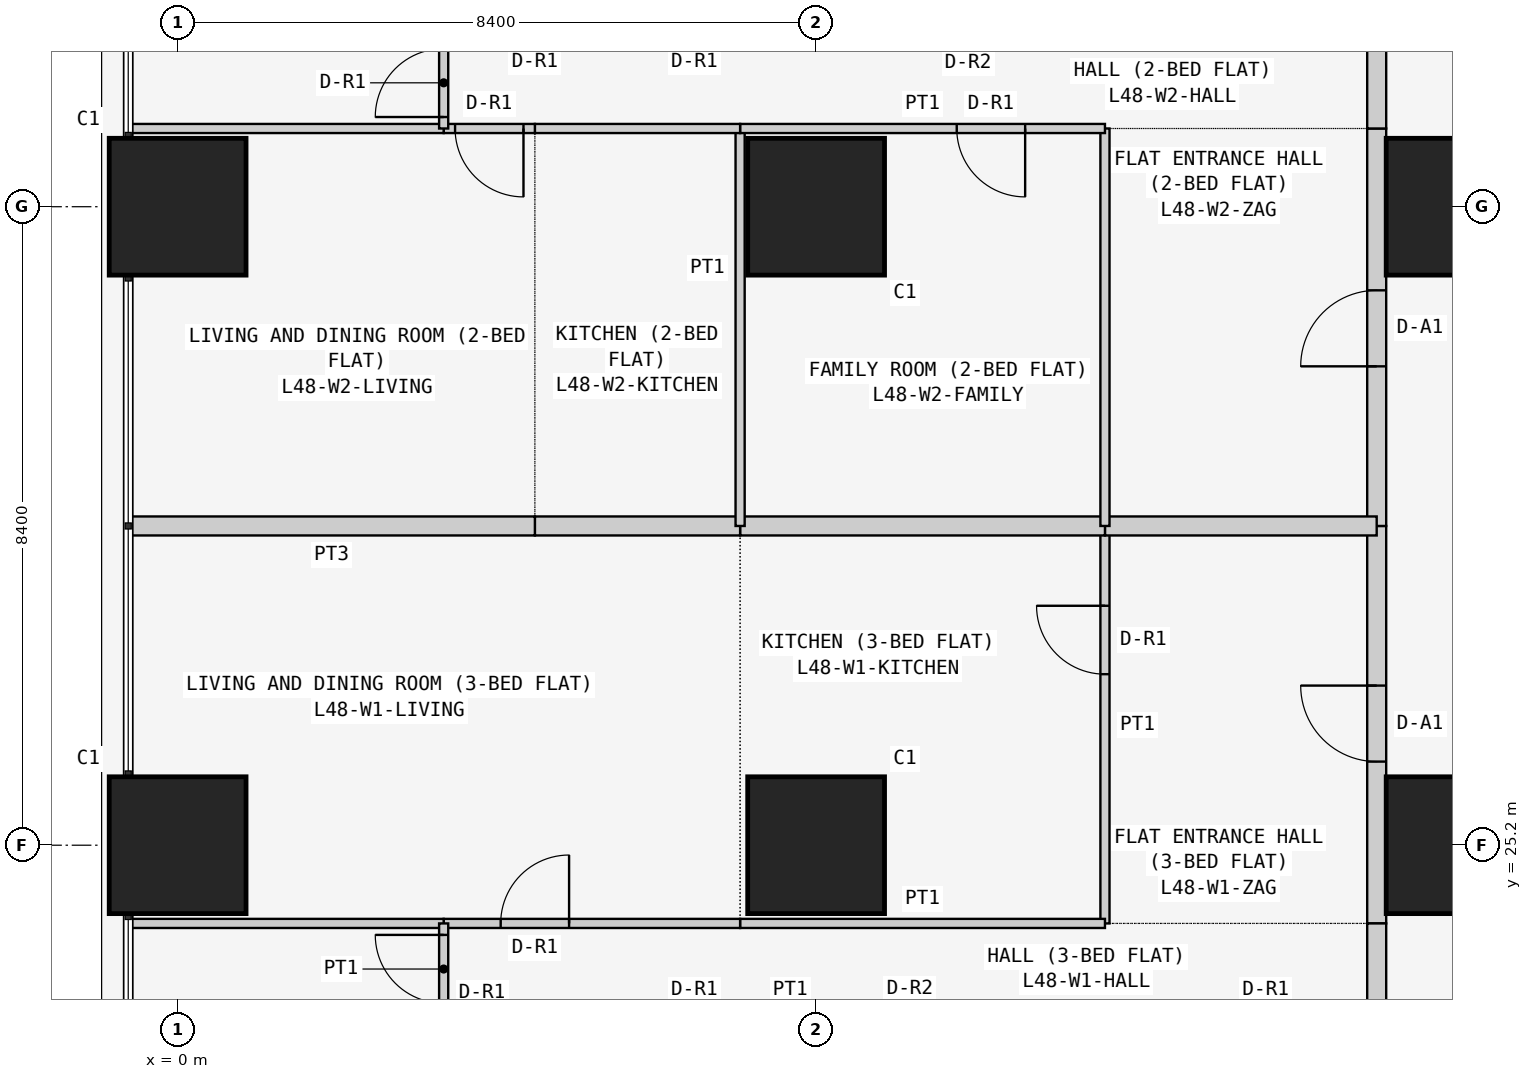
"""IFC4 building model, lengths in metres.
Left out: names, types, materials, properties, quantities, classifications, styles, units other than length and angle.
Written with IfcOpenShell. Run it as: python <this file> out.ifc"""

import sys

from ifc_helpers import new_model, si_unit, direction, frame, frame_2d, origin, origin_2d, place, context, subcontext, project, spatial, rectangle, extrude, element, fill, save


model = new_model("IFC4")
c1 = context("Model", 3, precision=1e-05, world=origin(), true_north=direction((0.0, 1.0)))
c2 = subcontext(c1, "Body", "Model", "MODEL_VIEW")
j1 = project(units=[si_unit("LENGTHUNIT", "METRE"), si_unit("PLANEANGLEUNIT", "RADIAN")], contexts=[c1])
p1 = place(None, origin())
s1 = spatial("IfcSite", under=j1, at=p1, CompositionType="ELEMENT")
p2 = place(p1, origin())
s2 = spatial("IfcBuilding", under=s1, at=p2, CompositionType="ELEMENT")
p3 = place(p2, frame((0.0, 0.0, 186.9)))
s3 = spatial("IfcBuildingStorey", under=s2, at=p3, CompositionType="ELEMENT", Elevation=186.9)
for number, where, z_axis, x_axis in (
    (1, (0.0, 25.2, 0.0), (0.0, 0.0, 1.0), (1.0, 0.0, 0.0)),
    (2, (0.0, 33.6, 0.0), (0.0, 0.0, 1.0), (1.0, 0.0, 0.0)),
    (3, (8.4, 25.2, 0.0), (0.0, 0.0, 1.0), (1.0, 0.0, 0.0)),
    (4, (8.4, 33.6, 0.0), (0.0, 0.0, 1.0), (1.0, 0.0, 0.0)),
    (5, (16.8, 25.2, 0.0), (0.0, 0.0, 1.0), (1.0, 0.0, 0.0)),
    (6, (16.8, 33.6, 0.0), (0.0, 0.0, 1.0), (1.0, 0.0, 0.0)),
):
    element("IfcColumn", number, at=place(p3, frame(where, z_axis=z_axis, x_axis=x_axis)), inside=s3, PredefinedType="COLUMN", context=c2, shape_type="SweptSolid", body=[
        extrude(rectangle(XDim=1.8, YDim=1.8, at=origin_2d()), origin(), (0.0, 0.0, 1.0), 3.6),
    ])
p4 = place(p3, frame((15.775, 24.171, 0.0), z_axis=(0.0, 0.0, 1.0), x_axis=(0.0, 1.0, 0.0)))
e7 = element("IfcWall", 7, at=p4, inside=s3, PredefinedType="PARTITIONING", context=c2, shape_type="SweptSolid", body=[
    extrude(rectangle(XDim=5.229, YDim=0.25, at=frame_2d((2.615, 0.0))), origin(), (0.0, 0.0, 1.0), 3.45),
])
p5 = place(p4, frame((2.129, 0.0, 0.0)))
e8 = element("IfcOpeningElement", 8, at=p5, cuts=e7, PredefinedType="OPENING", context=c2, shape_type="SweptSolid", body=[
    extrude(rectangle(XDim=1.0, YDim=2.1, at=frame_2d((0.5, 1.05))), frame((0.0, 0.135, 0.0), z_axis=(0.0, -1.0, 0.0), x_axis=(1.0, 0.0, 0.0)), (0.0, 0.0, 1.0), 0.27),
])
p6 = place(p3, frame((15.775, 22.971, 0.0), z_axis=(0.0, 0.0, 1.0), x_axis=(0.0, 1.0, 0.0)))
e9 = element("IfcWall", 9, at=p6, inside=s3, PredefinedType="PARTITIONING", context=c2, shape_type="SweptSolid", body=[
    extrude(rectangle(XDim=1.2, YDim=0.25, at=frame_2d((0.6, 0.0))), origin(), (0.0, 0.0, 1.0), 3.45),
])
p7 = place(p3, frame((15.775, 29.4, 0.0), z_axis=(0.0, 0.0, 1.0), x_axis=(0.0, 1.0, 0.0)))
e10 = element("IfcWall", 10, at=p7, inside=s3, PredefinedType="PARTITIONING", context=c2, shape_type="SweptSolid", body=[
    extrude(rectangle(XDim=5.229, YDim=0.25, at=frame_2d((2.615, 0.0))), origin(), (0.0, 0.0, 1.0), 3.45),
])
p8 = place(p7, frame((2.1, 0.0, 0.0)))
e11 = element("IfcOpeningElement", 11, at=p8, cuts=e10, PredefinedType="OPENING", context=c2, shape_type="SweptSolid", body=[
    extrude(rectangle(XDim=1.0, YDim=2.1, at=frame_2d((0.5, 1.05))), frame((0.0, 0.135, 0.0), z_axis=(0.0, -1.0, 0.0), x_axis=(1.0, 0.0, 0.0)), (0.0, 0.0, 1.0), 0.27),
])
p9 = place(p3, frame((15.775, 34.629, 0.0), z_axis=(0.0, 0.0, 1.0), x_axis=(0.0, 1.0, 0.0)))
e12 = element("IfcWall", 12, at=p9, inside=s3, PredefinedType="PARTITIONING", context=c2, shape_type="SweptSolid", body=[
    extrude(rectangle(XDim=1.2, YDim=0.25, at=frame_2d((0.6, 0.0))), origin(), (0.0, 0.0, 1.0), 3.45),
])
p10 = place(p3, frame((12.2, 29.4, 0.0), z_axis=(0.0, 0.0, 1.0), x_axis=(0.0, -1.0, 0.0)))
e13 = element("IfcWall", 13, at=p10, inside=s3, PredefinedType="PARTITIONING", context=c2, shape_type="SweptSolid", body=[
    extrude(rectangle(XDim=5.229, YDim=0.12, at=frame_2d((2.615, 0.0))), origin(), (0.0, 0.0, 1.0), 3.45),
])
p11 = place(p10, frame((1.05, 0.0, 0.0)))
e14 = element("IfcOpeningElement", 14, at=p11, cuts=e13, PredefinedType="OPENING", context=c2, shape_type="SweptSolid", body=[
    extrude(rectangle(XDim=0.9, YDim=2.1, at=frame_2d((0.45, 1.05))), frame((0.0, 0.07, 0.0), z_axis=(0.0, -1.0, 0.0), x_axis=(1.0, 0.0, 0.0)), (0.0, 0.0, 1.0), 0.14),
])
p12 = place(p3, frame((15.775, 29.4, 0.0), z_axis=(0.0, 0.0, 1.0), x_axis=(-1.0, 0.0, 0.0)))
e15 = element("IfcWall", 15, at=p12, inside=s3, PredefinedType="PARTITIONING", context=c2, shape_type="SweptSolid", body=[
    extrude(rectangle(XDim=3.575, YDim=0.25, at=frame_2d((1.788, 0.0))), origin(), (0.0, 0.0, 1.0), 3.45),
])
p13 = place(p3, frame((7.4, 24.171, 0.0), z_axis=(0.0, 0.0, 1.0), x_axis=(1.0, 0.0, 0.0)))
e16 = element("IfcWall", 16, at=p13, inside=s3, PredefinedType="PARTITIONING", context=c2, shape_type="SweptSolid", body=[
    extrude(rectangle(XDim=4.8, YDim=0.12, at=frame_2d((2.4, 0.0))), origin(), (0.0, 0.0, 1.0), 3.45),
])
p14 = place(p3, frame((12.2, 29.4, 0.0), z_axis=(0.0, 0.0, 1.0), x_axis=(-1.0, 0.0, 0.0)))
e17 = element("IfcWall", 17, at=p14, inside=s3, PredefinedType="PARTITIONING", context=c2, shape_type="SweptSolid", body=[
    extrude(rectangle(XDim=4.8, YDim=0.25, at=frame_2d((2.4, 0.0))), origin(), (0.0, 0.0, 1.0), 3.45),
])
p15 = place(p3, frame((3.5, 24.171, 0.0), z_axis=(0.0, 0.0, 1.0), x_axis=(1.0, 0.0, 0.0)))
e18 = element("IfcWall", 18, at=p15, inside=s3, PredefinedType="PARTITIONING", context=c2, shape_type="SweptSolid", body=[
    extrude(rectangle(XDim=3.9, YDim=0.12, at=frame_2d((1.95, 0.0))), origin(), (0.0, 0.0, 1.0), 3.45),
])
p16 = place(p15, frame((0.75, 0.0, 0.0)))
e19 = element("IfcOpeningElement", 19, at=p16, cuts=e18, PredefinedType="OPENING", context=c2, shape_type="SweptSolid", body=[
    extrude(rectangle(XDim=0.9, YDim=2.1, at=frame_2d((0.45, 1.05))), frame((0.0, 0.07, 0.0), z_axis=(0.0, -1.0, 0.0), x_axis=(1.0, 0.0, 0.0)), (0.0, 0.0, 1.0), 0.14),
])
p17 = place(p3, frame((-0.65, 24.171, 0.0), z_axis=(0.0, 0.0, 1.0), x_axis=(1.0, 0.0, 0.0)))
e20 = element("IfcWall", 20, at=p17, inside=s3, PredefinedType="PARTITIONING", context=c2, shape_type="SweptSolid", body=[
    extrude(rectangle(XDim=4.15, YDim=0.12, at=frame_2d((2.075, 0.0))), origin(), (0.0, 0.0, 1.0), 3.45),
])
p18 = place(p3, frame((7.4, 29.4, 0.0), z_axis=(0.0, 0.0, 1.0), x_axis=(-1.0, 0.0, 0.0)))
e21 = element("IfcWall", 21, at=p18, inside=s3, PredefinedType="PARTITIONING", context=c2, shape_type="SweptSolid", body=[
    extrude(rectangle(XDim=2.7, YDim=0.25, at=frame_2d((1.35, 0.0))), origin(), (0.0, 0.0, 1.0), 3.45),
])
p19 = place(p3, frame((4.7, 29.4, 0.0), z_axis=(0.0, 0.0, 1.0), x_axis=(-1.0, 0.0, 0.0)))
e22 = element("IfcWall", 22, at=p19, inside=s3, PredefinedType="PARTITIONING", context=c2, shape_type="SweptSolid", body=[
    extrude(rectangle(XDim=5.35, YDim=0.25, at=frame_2d((2.675, 0.0))), origin(), (0.0, 0.0, 1.0), 3.45),
])
p20 = place(p3, frame((3.5, 24.171, 0.0), z_axis=(0.0, 0.0, 1.0), x_axis=(0.0, -1.0, 0.0)))
e23 = element("IfcWall", 23, at=p20, inside=s3, PredefinedType="PARTITIONING", context=c2, shape_type="SweptSolid", body=[
    extrude(rectangle(XDim=1.2, YDim=0.12, at=frame_2d((0.6, 0.0))), origin(), (0.0, 0.0, 1.0), 3.45),
])
p21 = place(p20, frame((0.151, 0.0, 0.0)))
e24 = element("IfcOpeningElement", 24, at=p21, cuts=e23, PredefinedType="OPENING", context=c2, shape_type="SweptSolid", body=[
    extrude(rectangle(XDim=0.9, YDim=2.1, at=frame_2d((0.45, 1.05))), frame((0.0, 0.07, 0.0), z_axis=(0.0, -1.0, 0.0), x_axis=(1.0, 0.0, 0.0)), (0.0, 0.0, 1.0), 0.14),
])
for number, where, z_axis, x_axis in (
    (25, (12.2, 29.4, 0.0), (0.0, 0.0, 1.0), (0.0, 1.0, 0.0)),
    (26, (7.4, 29.4, 0.0), (0.0, 0.0, 1.0), (0.0, 1.0, 0.0)),
):
    element("IfcWall", number, at=place(p3, frame(where, z_axis=z_axis, x_axis=x_axis)), inside=s3, PredefinedType="PARTITIONING", context=c2, shape_type="SweptSolid", body=[
        extrude(rectangle(XDim=5.229, YDim=0.12, at=frame_2d((2.615, 0.0))), origin(), (0.0, 0.0, 1.0), 3.45),
    ])
p22 = place(p3, frame((7.4, 34.629, 0.0), z_axis=(0.0, 0.0, 1.0), x_axis=(1.0, 0.0, 0.0)))
e27 = element("IfcWall", 27, at=p22, inside=s3, PredefinedType="PARTITIONING", context=c2, shape_type="SweptSolid", body=[
    extrude(rectangle(XDim=4.8, YDim=0.12, at=frame_2d((2.4, 0.0))), origin(), (0.0, 0.0, 1.0), 3.45),
])
p23 = place(p22, frame((2.85, 0.0, 0.0)))
e28 = element("IfcOpeningElement", 28, at=p23, cuts=e27, PredefinedType="OPENING", context=c2, shape_type="SweptSolid", body=[
    extrude(rectangle(XDim=0.9, YDim=2.1, at=frame_2d((0.45, 1.05))), frame((0.0, 0.07, 0.0), z_axis=(0.0, -1.0, 0.0), x_axis=(1.0, 0.0, 0.0)), (0.0, 0.0, 1.0), 0.14),
])
p24 = place(p3, frame((4.7, 34.629, 0.0), z_axis=(0.0, 0.0, 1.0), x_axis=(1.0, 0.0, 0.0)))
e29 = element("IfcWall", 29, at=p24, inside=s3, PredefinedType="PARTITIONING", context=c2, shape_type="SweptSolid", body=[
    extrude(rectangle(XDim=2.7, YDim=0.12, at=frame_2d((1.35, 0.0))), origin(), (0.0, 0.0, 1.0), 3.45),
])
p25 = place(p3, frame((3.5, 34.629, 0.0), z_axis=(0.0, 0.0, 1.0), x_axis=(1.0, 0.0, 0.0)))
e30 = element("IfcWall", 30, at=p25, inside=s3, PredefinedType="PARTITIONING", context=c2, shape_type="SweptSolid", body=[
    extrude(rectangle(XDim=1.2, YDim=0.12, at=frame_2d((0.6, 0.0))), origin(), (0.0, 0.0, 1.0), 3.45),
])
p26 = place(p25, frame((0.15, 0.0, 0.0)))
e31 = element("IfcOpeningElement", 31, at=p26, cuts=e30, PredefinedType="OPENING", context=c2, shape_type="SweptSolid", body=[
    extrude(rectangle(XDim=0.9, YDim=2.1, at=frame_2d((0.45, 1.05))), frame((0.0, 0.07, 0.0), z_axis=(0.0, -1.0, 0.0), x_axis=(1.0, 0.0, 0.0)), (0.0, 0.0, 1.0), 0.14),
])
p27 = place(p3, frame((-0.65, 34.629, 0.0), z_axis=(0.0, 0.0, 1.0), x_axis=(1.0, 0.0, 0.0)))
e32 = element("IfcWall", 32, at=p27, inside=s3, PredefinedType="PARTITIONING", context=c2, shape_type="SweptSolid", body=[
    extrude(rectangle(XDim=4.15, YDim=0.12, at=frame_2d((2.075, 0.0))), origin(), (0.0, 0.0, 1.0), 3.45),
])
p28 = place(p3, frame((3.5, 34.629, 0.0), z_axis=(0.0, 0.0, 1.0), x_axis=(0.0, 1.0, 0.0)))
e33 = element("IfcWall", 33, at=p28, inside=s3, PredefinedType="PARTITIONING", context=c2, shape_type="SweptSolid", body=[
    extrude(rectangle(XDim=1.2, YDim=0.12, at=frame_2d((0.6, 0.0))), origin(), (0.0, 0.0, 1.0), 3.45),
])
p29 = place(p28, frame((0.151, 0.0, 0.0)))
e34 = element("IfcOpeningElement", 34, at=p29, cuts=e33, PredefinedType="OPENING", context=c2, shape_type="SweptSolid", body=[
    extrude(rectangle(XDim=0.9, YDim=2.1, at=frame_2d((0.45, 1.05))), frame((0.0, 0.07, 0.0), z_axis=(0.0, -1.0, 0.0), x_axis=(1.0, 0.0, 0.0)), (0.0, 0.0, 1.0), 0.14),
])
p30 = place(p5, origin())
e35 = element("IfcDoor", 35, at=p30, inside=s3, OperationType="SINGLE_SWING_RIGHT", PredefinedType="DOOR", context=c2, shape_type="SweptSolid", body=[
    extrude(rectangle(XDim=1.0, YDim=2.1, at=frame_2d((0.5, 1.05))), frame((0.0, 0.025, 0.0), z_axis=(0.0, -1.0, 0.0), x_axis=(1.0, 0.0, 0.0)), (0.0, 0.0, 1.0), 0.05),
])
fill(e8, e35)
p31 = place(p11, frame((0.9, 0.0, 0.0), z_axis=(0.0, 0.0, 1.0), x_axis=(-1.0, 0.0, 0.0)))
e36 = element("IfcDoor", 36, at=p31, inside=s3, OperationType="SINGLE_SWING_RIGHT", PredefinedType="DOOR", context=c2, shape_type="SweptSolid", body=[
    extrude(rectangle(XDim=0.9, YDim=2.1, at=frame_2d((0.45, 1.05))), frame((0.0, 0.025, 0.0), z_axis=(0.0, -1.0, 0.0), x_axis=(1.0, 0.0, 0.0)), (0.0, 0.0, 1.0), 0.05),
])
fill(e14, e36)
p32 = place(p16, origin())
e37 = element("IfcDoor", 37, at=p32, inside=s3, OperationType="SINGLE_SWING_RIGHT", PredefinedType="DOOR", context=c2, shape_type="SweptSolid", body=[
    extrude(rectangle(XDim=0.9, YDim=2.1, at=frame_2d((0.45, 1.05))), frame((0.0, 0.025, 0.0), z_axis=(0.0, -1.0, 0.0), x_axis=(1.0, 0.0, 0.0)), (0.0, 0.0, 1.0), 0.05),
])
fill(e19, e37)
p33 = place(p21, frame((0.9, 0.0, 0.0), z_axis=(0.0, 0.0, 1.0), x_axis=(-1.0, 0.0, 0.0)))
e38 = element("IfcDoor", 38, at=p33, inside=s3, OperationType="SINGLE_SWING_RIGHT", PredefinedType="DOOR", context=c2, shape_type="SweptSolid", body=[
    extrude(rectangle(XDim=0.9, YDim=2.1, at=frame_2d((0.45, 1.05))), frame((0.0, 0.025, 0.0), z_axis=(0.0, -1.0, 0.0), x_axis=(1.0, 0.0, 0.0)), (0.0, 0.0, 1.0), 0.05),
])
fill(e24, e38)
p34 = place(p8, origin())
e39 = element("IfcDoor", 39, at=p34, inside=s3, OperationType="SINGLE_SWING_LEFT", PredefinedType="DOOR", context=c2, shape_type="SweptSolid", body=[
    extrude(rectangle(XDim=1.0, YDim=2.1, at=frame_2d((0.5, 1.05))), frame((0.0, 0.025, 0.0), z_axis=(0.0, -1.0, 0.0), x_axis=(1.0, 0.0, 0.0)), (0.0, 0.0, 1.0), 0.05),
])
fill(e11, e39)
p35 = place(p23, frame((0.9, 0.0, 0.0), z_axis=(0.0, 0.0, 1.0), x_axis=(-1.0, 0.0, 0.0)))
e40 = element("IfcDoor", 40, at=p35, inside=s3, OperationType="SINGLE_SWING_LEFT", PredefinedType="DOOR", context=c2, shape_type="SweptSolid", body=[
    extrude(rectangle(XDim=0.9, YDim=2.1, at=frame_2d((0.45, 1.05))), frame((0.0, 0.025, 0.0), z_axis=(0.0, -1.0, 0.0), x_axis=(1.0, 0.0, 0.0)), (0.0, 0.0, 1.0), 0.05),
])
fill(e28, e40)
p36 = place(p26, frame((0.9, 0.0, 0.0), z_axis=(0.0, 0.0, 1.0), x_axis=(-1.0, 0.0, 0.0)))
e41 = element("IfcDoor", 41, at=p36, inside=s3, OperationType="SINGLE_SWING_LEFT", PredefinedType="DOOR", context=c2, shape_type="SweptSolid", body=[
    extrude(rectangle(XDim=0.9, YDim=2.1, at=frame_2d((0.45, 1.05))), frame((0.0, 0.025, 0.0), z_axis=(0.0, -1.0, 0.0), x_axis=(1.0, 0.0, 0.0)), (0.0, 0.0, 1.0), 0.05),
])
fill(e31, e41)
p37 = place(p29, origin())
e42 = element("IfcDoor", 42, at=p37, inside=s3, OperationType="SINGLE_SWING_LEFT", PredefinedType="DOOR", context=c2, shape_type="SweptSolid", body=[
    extrude(rectangle(XDim=0.9, YDim=2.1, at=frame_2d((0.45, 1.05))), frame((0.0, 0.025, 0.0), z_axis=(0.0, -1.0, 0.0), x_axis=(1.0, 0.0, 0.0)), (0.0, 0.0, 1.0), 0.05),
])
fill(e34, e42)
save(model, sys.argv[1])
